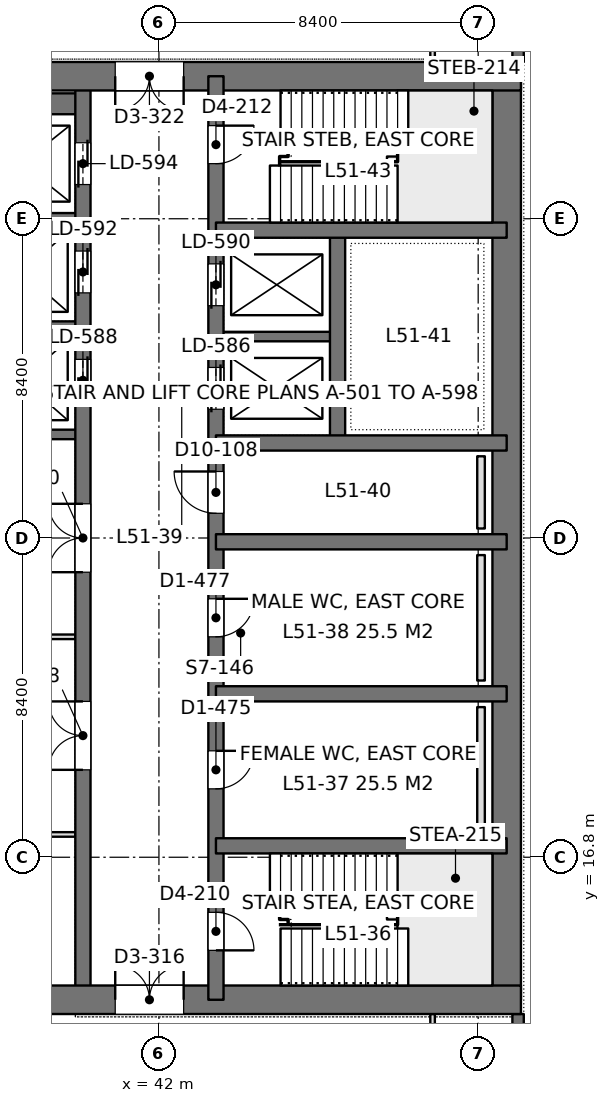
"""IFC4 building model, lengths in metres.
Left out: names, types, materials, properties, quantities, classifications, styles, units other than length and angle.
Written with IfcOpenShell. Run it as: python <this file> out.ifc"""

import sys

from ifc_helpers import new_model, si_unit, direction, frame, frame_2d, origin, place, context, subcontext, project, spatial, rectangle, extrude, element, fill, save


model = new_model("IFC4")
c1 = context("Model", 3, precision=1e-05, world=origin(), true_north=direction((0.0, 1.0)))
c2 = subcontext(c1, "Body", "Model", "MODEL_VIEW")
j1 = project(units=[si_unit("LENGTHUNIT", "METRE"), si_unit("PLANEANGLEUNIT", "RADIAN")], contexts=[c1])
p1 = place(None, origin())
s1 = spatial("IfcSite", under=j1, at=p1, CompositionType="ELEMENT")
p2 = place(p1, origin())
s2 = spatial("IfcBuilding", under=s1, at=p2, CompositionType="ELEMENT")
p3 = place(p2, frame((0.0, 0.0, 223.8)))
s3 = spatial("IfcBuildingStorey", under=s2, at=p3, CompositionType="ELEMENT", Elevation=223.8)
p4 = place(p3, frame((33.675, 13.05, 0.0), z_axis=(0.0, 0.0, 1.0), x_axis=(1.0, 0.0, 0.0)))
e1 = element("IfcWall", 1, at=p4, inside=s3, PredefinedType="SHEAR", context=c2, shape_type="SweptSolid", body=[
    extrude(rectangle(XDim=17.85, YDim=0.75, at=frame_2d((8.925, 0.0))), origin(), (0.0, 0.0, 1.0), 4.2),
])
p5 = place(p4, frame((7.175, 0.0, 0.0)))
e2 = element("IfcOpeningElement", 2, at=p5, cuts=e1, PredefinedType="OPENING", context=c2, shape_type="SweptSolid", body=[
    extrude(rectangle(XDim=1.8, YDim=2.4, at=frame_2d((0.9, 1.2))), frame((0.0, 0.385, 0.0), z_axis=(0.0, -1.0, 0.0), x_axis=(1.0, 0.0, 0.0)), (0.0, 0.0, 1.0), 0.77),
])
p6 = place(p3, frame((33.675, 37.35, 0.0), z_axis=(0.0, 0.0, 1.0), x_axis=(1.0, 0.0, 0.0)))
e3 = element("IfcWall", 3, at=p6, inside=s3, PredefinedType="SHEAR", context=c2, shape_type="SweptSolid", body=[
    extrude(rectangle(XDim=17.85, YDim=0.75, at=frame_2d((8.925, 0.0))), origin(), (0.0, 0.0, 1.0), 4.2),
])
p7 = place(p6, frame((7.175, 0.0, 0.0)))
e4 = element("IfcOpeningElement", 4, at=p7, cuts=e3, PredefinedType="OPENING", context=c2, shape_type="SweptSolid", body=[
    extrude(rectangle(XDim=1.8, YDim=2.4, at=frame_2d((0.9, 1.2))), frame((0.0, 0.385, 0.0), z_axis=(0.0, -1.0, 0.0), x_axis=(1.0, 0.0, 0.0)), (0.0, 0.0, 1.0), 0.77),
])
p8 = place(p3, frame((51.15, 13.05, 0.0), z_axis=(0.0, 0.0, 1.0), x_axis=(0.0, 1.0, 0.0)))
e5 = element("IfcWall", 5, at=p8, inside=s3, PredefinedType="SHEAR", context=c2, shape_type="SweptSolid", body=[
    extrude(rectangle(XDim=24.3, YDim=0.75, at=frame_2d((12.15, 0.0))), origin(), (0.0, 0.0, 1.0), 4.2),
])
p9 = place(p3, frame((43.5, 13.05, 0.0), z_axis=(0.0, 0.0, 1.0), x_axis=(0.0, 1.0, 0.0)))
e6 = element("IfcWall", 6, at=p9, inside=s3, PredefinedType="SHEAR", context=c2, shape_type="SweptSolid", body=[
    extrude(rectangle(XDim=24.3, YDim=0.4, at=frame_2d((12.15, 0.0))), origin(), (0.0, 0.0, 1.0), 4.2),
])
p10 = place(p9, frame((1.3, 0.0, 0.0)))
e7 = element("IfcOpeningElement", 7, at=p10, cuts=e6, PredefinedType="OPENING", context=c2, shape_type="SweptSolid", body=[
    extrude(rectangle(XDim=1.0, YDim=2.2, at=frame_2d((0.5, 1.1))), frame((0.0, 0.21, 0.0), z_axis=(0.0, -1.0, 0.0), x_axis=(1.0, 0.0, 0.0)), (0.0, 0.0, 1.0), 0.42),
])
p11 = place(p9, frame((22.0, 0.0, 0.0)))
e8 = element("IfcOpeningElement", 8, at=p11, cuts=e6, PredefinedType="OPENING", context=c2, shape_type="SweptSolid", body=[
    extrude(rectangle(XDim=1.0, YDim=2.2, at=frame_2d((0.5, 1.1))), frame((0.0, 0.21, 0.0), z_axis=(0.0, -1.0, 0.0), x_axis=(1.0, 0.0, 0.0)), (0.0, 0.0, 1.0), 0.42),
])
p12 = place(p9, frame((5.55, 0.0, 0.0)))
e9 = element("IfcOpeningElement", 9, at=p12, cuts=e6, PredefinedType="OPENING", context=c2, shape_type="SweptSolid", body=[
    extrude(rectangle(XDim=1.0, YDim=2.2, at=frame_2d((0.5, 1.1))), frame((0.0, 0.21, 0.0), z_axis=(0.0, -1.0, 0.0), x_axis=(1.0, 0.0, 0.0)), (0.0, 0.0, 1.0), 0.42),
])
p13 = place(p9, frame((9.55, 0.0, 0.0)))
e10 = element("IfcOpeningElement", 10, at=p13, cuts=e6, PredefinedType="OPENING", context=c2, shape_type="SweptSolid", body=[
    extrude(rectangle(XDim=1.0, YDim=2.2, at=frame_2d((0.5, 1.1))), frame((0.0, 0.21, 0.0), z_axis=(0.0, -1.0, 0.0), x_axis=(1.0, 0.0, 0.0)), (0.0, 0.0, 1.0), 0.42),
])
p14 = place(p9, frame((12.8, 0.0, 0.0)))
e11 = element("IfcOpeningElement", 11, at=p14, cuts=e6, PredefinedType="OPENING", context=c2, shape_type="SweptSolid", body=[
    extrude(rectangle(XDim=1.1, YDim=2.2, at=frame_2d((0.55, 1.1))), frame((0.0, 0.21, 0.0), z_axis=(0.0, -1.0, 0.0), x_axis=(1.0, 0.0, 0.0)), (0.0, 0.0, 1.0), 0.42),
])
p15 = place(p9, frame((15.538, 0.0, 0.0)))
e12 = element("IfcOpeningElement", 12, at=p15, cuts=e6, PredefinedType="OPENING", context=c2, shape_type="SweptSolid", body=[
    extrude(rectangle(XDim=1.1, YDim=2.2, at=frame_2d((0.55, 1.1))), frame((0.0, 0.21, 0.0), z_axis=(0.0, -1.0, 0.0), x_axis=(1.0, 0.0, 0.0)), (0.0, 0.0, 1.0), 0.42),
])
p16 = place(p9, frame((18.262, 0.0, 0.0)))
e13 = element("IfcOpeningElement", 13, at=p16, cuts=e6, PredefinedType="OPENING", context=c2, shape_type="SweptSolid", body=[
    extrude(rectangle(XDim=1.1, YDim=2.2, at=frame_2d((0.55, 1.1))), frame((0.0, 0.21, 0.0), z_axis=(0.0, -1.0, 0.0), x_axis=(1.0, 0.0, 0.0)), (0.0, 0.0, 1.0), 0.42),
])
p17 = place(p3, frame((40.0, 13.05, 0.0), z_axis=(0.0, 0.0, 1.0), x_axis=(0.0, 1.0, 0.0)))
e14 = element("IfcWall", 14, at=p17, inside=s3, PredefinedType="SHEAR", context=c2, shape_type="SweptSolid", body=[
    extrude(rectangle(XDim=24.3, YDim=0.4, at=frame_2d((12.15, 0.0))), origin(), (0.0, 0.0, 1.0), 4.2),
])
p18 = place(p17, frame((15.75, 0.0, 0.0)))
e15 = element("IfcOpeningElement", 15, at=p18, cuts=e14, PredefinedType="OPENING", context=c2, shape_type="SweptSolid", body=[
    extrude(rectangle(XDim=1.1, YDim=2.2, at=frame_2d((0.55, 1.1))), frame((0.0, 0.21, 0.0), z_axis=(0.0, -1.0, 0.0), x_axis=(1.0, 0.0, 0.0)), (0.0, 0.0, 1.0), 0.42),
])
p19 = place(p17, frame((18.6, 0.0, 0.0)))
e16 = element("IfcOpeningElement", 16, at=p19, cuts=e14, PredefinedType="OPENING", context=c2, shape_type="SweptSolid", body=[
    extrude(rectangle(XDim=1.1, YDim=2.2, at=frame_2d((0.55, 1.1))), frame((0.0, 0.21, 0.0), z_axis=(0.0, -1.0, 0.0), x_axis=(1.0, 0.0, 0.0)), (0.0, 0.0, 1.0), 0.42),
])
p20 = place(p17, frame((21.45, 0.0, 0.0)))
e17 = element("IfcOpeningElement", 17, at=p20, cuts=e14, PredefinedType="OPENING", context=c2, shape_type="SweptSolid", body=[
    extrude(rectangle(XDim=1.1, YDim=2.2, at=frame_2d((0.55, 1.1))), frame((0.0, 0.21, 0.0), z_axis=(0.0, -1.0, 0.0), x_axis=(1.0, 0.0, 0.0)), (0.0, 0.0, 1.0), 0.42),
])
p21 = place(p17, frame((6.05, 0.0, 0.0)))
e18 = element("IfcOpeningElement", 18, at=p21, cuts=e14, PredefinedType="OPENING", context=c2, shape_type="SweptSolid", body=[
    extrude(rectangle(XDim=1.8, YDim=2.4, at=frame_2d((0.9, 1.2))), frame((0.0, 0.21, 0.0), z_axis=(0.0, -1.0, 0.0), x_axis=(1.0, 0.0, 0.0)), (0.0, 0.0, 1.0), 0.42),
])
p22 = place(p17, frame((11.25, 0.0, 0.0)))
e19 = element("IfcOpeningElement", 19, at=p22, cuts=e14, PredefinedType="OPENING", context=c2, shape_type="SweptSolid", body=[
    extrude(rectangle(XDim=1.8, YDim=2.4, at=frame_2d((0.9, 1.2))), frame((0.0, 0.21, 0.0), z_axis=(0.0, -1.0, 0.0), x_axis=(1.0, 0.0, 0.0)), (0.0, 0.0, 1.0), 0.42),
])
for number, where, z_axis, x_axis in (
    (20, (51.15, 17.1, 0.0), (0.0, 0.0, 1.0), (-1.0, 0.0, 0.0)),
    (21, (51.15, 21.1, 0.0), (0.0, 0.0, 1.0), (-1.0, 0.0, 0.0)),
    (22, (51.15, 25.1, 0.0), (0.0, 0.0, 1.0), (-1.0, 0.0, 0.0)),
    (23, (51.15, 27.7, 0.0), (0.0, 0.0, 1.0), (-1.0, 0.0, 0.0)),
    (24, (51.15, 33.3, 0.0), (0.0, 0.0, 1.0), (-1.0, 0.0, 0.0)),
):
    element("IfcWall", number, at=place(p3, frame(where, z_axis=z_axis, x_axis=x_axis)), inside=s3, PredefinedType="SHEAR", context=c2, shape_type="SweptSolid", body=[
        extrude(rectangle(XDim=7.65, YDim=0.4, at=frame_2d((3.825, 0.0))), origin(), (0.0, 0.0, 1.0), 4.2),
    ])
p23 = place(p3, frame((46.7, 27.7, 0.0), z_axis=(0.0, 0.0, 1.0), x_axis=(0.0, 1.0, 0.0)))
e25 = element("IfcWall", 25, at=p23, inside=s3, PredefinedType="SHEAR", context=c2, shape_type="SweptSolid", body=[
    extrude(rectangle(XDim=5.6, YDim=0.4, at=frame_2d((2.8, 0.0))), origin(), (0.0, 0.0, 1.0), 4.2),
])
p24 = place(p3, frame((46.7, 30.5, 0.0), z_axis=(0.0, 0.0, 1.0), x_axis=(-1.0, 0.0, 0.0)))
e26 = element("IfcWall", 26, at=p24, inside=s3, PredefinedType="SHEAR", context=c2, shape_type="SweptSolid", body=[
    extrude(rectangle(XDim=3.2, YDim=0.25, at=frame_2d((1.6, 0.0))), origin(), (0.0, 0.0, 1.0), 4.2),
])
p25 = place(p3, frame((40.0, 27.925, 0.0), z_axis=(0.0, 0.0, 1.0), x_axis=(-1.0, 0.0, 0.0)))
e27 = element("IfcWall", 27, at=p25, inside=s3, PredefinedType="SHEAR", context=c2, shape_type="SweptSolid", body=[
    extrude(rectangle(XDim=5.95, YDim=0.25, at=frame_2d((2.975, 0.0))), origin(), (0.0, 0.0, 1.0), 4.2),
])
for number, where, z_axis, x_axis in (
    (28, (40.0, 30.775, 0.0), (0.0, 0.0, 1.0), (-1.0, 0.0, 0.0)),
    (29, (40.0, 33.625, 0.0), (0.0, 0.0, 1.0), (-1.0, 0.0, 0.0)),
):
    element("IfcWall", number, at=place(p3, frame(where, z_axis=z_axis, x_axis=x_axis)), inside=s3, PredefinedType="SHEAR", context=c2, shape_type="SweptSolid", body=[
        extrude(rectangle(XDim=3.2, YDim=0.25, at=frame_2d((1.6, 0.0))), origin(), (0.0, 0.0, 1.0), 4.2),
    ])
p26 = place(p3, frame((40.0, 36.625, 0.0), z_axis=(0.0, 0.0, 1.0), x_axis=(-1.0, 0.0, 0.0)))
e30 = element("IfcWall", 30, at=p26, inside=s3, PredefinedType="SHEAR", context=c2, shape_type="SweptSolid", body=[
    extrude(rectangle(XDim=3.2, YDim=0.55, at=frame_2d((1.6, 0.0))), origin(), (0.0, 0.0, 1.0), 4.2),
])
p27 = place(p3, frame((51.45, 42.0, 0.0), z_axis=(0.0, 0.0, 1.0), x_axis=(0.0, -1.0, 0.0)))
e31 = element("IfcWall", 31, at=p27, inside=s3, PredefinedType="SOLIDWALL", context=c2, shape_type="SweptSolid", body=[
    extrude(rectangle(XDim=4.275, YDim=0.3, at=frame_2d((2.137, 0.0))), origin(), (0.0, 0.0, 1.0), 4.05),
])
p28 = place(p27, frame((0.938, 0.0, 0.9)))
e32 = element("IfcOpeningElement", 32, at=p28, cuts=e31, PredefinedType="OPENING", context=c2, shape_type="SweptSolid", body=[
    extrude(rectangle(XDim=2.4, YDim=1.9, at=frame_2d((1.2, 0.95))), frame((0.0, 0.16, 0.0), z_axis=(0.0, -1.0, 0.0), x_axis=(1.0, 0.0, 0.0)), (0.0, 0.0, 1.0), 0.32),
])
p29 = place(p3, frame((51.45, 12.675, 0.0), z_axis=(0.0, 0.0, 1.0), x_axis=(0.0, -1.0, 0.0)))
e33 = element("IfcWall", 33, at=p29, inside=s3, PredefinedType="SOLIDWALL", context=c2, shape_type="SweptSolid", body=[
    extrude(rectangle(XDim=4.275, YDim=0.3, at=frame_2d((2.138, 0.0))), origin(), (0.0, 0.0, 1.0), 4.05),
])
p30 = place(p29, frame((0.938, 0.0, 0.9)))
e34 = element("IfcOpeningElement", 34, at=p30, cuts=e33, PredefinedType="OPENING", context=c2, shape_type="SweptSolid", body=[
    extrude(rectangle(XDim=2.4, YDim=1.9, at=frame_2d((1.2, 0.95))), frame((0.0, 0.16, 0.0), z_axis=(0.0, -1.0, 0.0), x_axis=(1.0, 0.0, 0.0)), (0.0, 0.0, 1.0), 0.32),
])
p31 = place(p3, frame((33.898, 17.4, 0.0), z_axis=(0.0, 0.0, 1.0), x_axis=(1.0, 0.0, 0.0)))
e35 = element("IfcWall", 35, at=p31, inside=s3, PredefinedType="PARTITIONING", context=c2, shape_type="SweptSolid", body=[
    extrude(rectangle(XDim=5.904, YDim=0.12, at=frame_2d((2.952, 0.0))), origin(), (0.0, 0.0, 1.0), 3.55),
])
p32 = place(p3, frame((34.749, 22.6, 0.0), z_axis=(0.0, 0.0, 1.0), x_axis=(1.0, 0.0, 0.0)))
e36 = element("IfcWall", 36, at=p32, inside=s3, PredefinedType="PARTITIONING", context=c2, shape_type="SweptSolid", body=[
    extrude(rectangle(XDim=5.053, YDim=0.12, at=frame_2d((2.526, 0.0))), origin(), (0.0, 0.0, 1.0), 4.05),
])
for number, where, z_axis, x_axis in (
    (37, (49.2, 11.1, 0.0), (0.0, 0.0, 1.0), (0.0, 1.0, 0.0)),
    (38, (49.2, 37.724, 0.0), (0.0, 0.0, 1.0), (0.0, 1.0, 0.0)),
):
    element("IfcWall", number, at=place(p3, frame(where, z_axis=z_axis, x_axis=x_axis)), inside=s3, PredefinedType="PARTITIONING", context=c2, shape_type="SweptSolid", body=[
        extrude(rectangle(XDim=1.576, YDim=0.12, at=frame_2d((0.788, 0.0))), origin(), (0.0, 0.0, 1.0), 4.05),
    ])
for number, where, z_axis, x_axis in (
    (39, (50.475, 17.45, 0.0), (0.0, 0.0, 1.0), (0.0, 1.0, 0.0)),
    (40, (50.475, 21.45, 0.0), (0.0, 0.0, 1.0), (0.0, 1.0, 0.0)),
):
    element("IfcWall", number, at=place(p3, frame(where, z_axis=z_axis, x_axis=x_axis)), inside=s3, PredefinedType="PLUMBINGWALL", context=c2, shape_type="SweptSolid", body=[
        extrude(rectangle(XDim=3.3, YDim=0.2, at=frame_2d((1.65, 0.0))), origin(), (0.0, 0.0, 1.0), 1.2),
    ])
p33 = place(p3, frame((50.475, 25.45, 0.0), z_axis=(0.0, 0.0, 1.0), x_axis=(0.0, 1.0, 0.0)))
e41 = element("IfcWall", 41, at=p33, inside=s3, PredefinedType="PLUMBINGWALL", context=c2, shape_type="SweptSolid", body=[
    extrude(rectangle(XDim=1.9, YDim=0.2, at=frame_2d((0.95, 0.0))), origin(), (0.0, 0.0, 1.0), 1.2),
])
p34 = place(p5, origin())
e42 = element("IfcDoor", 42, at=p34, inside=s3, OperationType="DOUBLE_DOOR_SINGLE_SWING", PredefinedType="DOOR", context=c2, shape_type="SweptSolid", body=[
    extrude(rectangle(XDim=1.8, YDim=2.4, at=frame_2d((0.9, 1.2))), frame((0.0, 0.025, 0.0), z_axis=(0.0, -1.0, 0.0), x_axis=(1.0, 0.0, 0.0)), (0.0, 0.0, 1.0), 0.05),
])
fill(e2, e42)
p35 = place(p7, frame((1.8, 0.0, 0.0), z_axis=(0.0, 0.0, 1.0), x_axis=(-1.0, 0.0, 0.0)))
e43 = element("IfcDoor", 43, at=p35, inside=s3, OperationType="DOUBLE_DOOR_SINGLE_SWING", PredefinedType="DOOR", context=c2, shape_type="SweptSolid", body=[
    extrude(rectangle(XDim=1.8, YDim=2.4, at=frame_2d((0.9, 1.2))), frame((0.0, 0.025, 0.0), z_axis=(0.0, -1.0, 0.0), x_axis=(1.0, 0.0, 0.0)), (0.0, 0.0, 1.0), 0.05),
])
fill(e4, e43)
p36 = place(p10, frame((1.0, 0.0, 0.0), z_axis=(0.0, 0.0, 1.0), x_axis=(-1.0, 0.0, 0.0)))
e44 = element("IfcDoor", 44, at=p36, inside=s3, OperationType="SINGLE_SWING_RIGHT", PredefinedType="DOOR", context=c2, shape_type="SweptSolid", body=[
    extrude(rectangle(XDim=1.0, YDim=2.2, at=frame_2d((0.5, 1.1))), frame((0.0, 0.025, 0.0), z_axis=(0.0, -1.0, 0.0), x_axis=(1.0, 0.0, 0.0)), (0.0, 0.0, 1.0), 0.05),
])
fill(e7, e44)
p37 = place(p11, frame((1.0, 0.0, 0.0), z_axis=(0.0, 0.0, 1.0), x_axis=(-1.0, 0.0, 0.0)))
e45 = element("IfcDoor", 45, at=p37, inside=s3, OperationType="SINGLE_SWING_LEFT", PredefinedType="DOOR", context=c2, shape_type="SweptSolid", body=[
    extrude(rectangle(XDim=1.0, YDim=2.2, at=frame_2d((0.5, 1.1))), frame((0.0, 0.025, 0.0), z_axis=(0.0, -1.0, 0.0), x_axis=(1.0, 0.0, 0.0)), (0.0, 0.0, 1.0), 0.05),
])
fill(e8, e45)
p38 = place(p12, frame((1.0, 0.0, 0.0), z_axis=(0.0, 0.0, 1.0), x_axis=(-1.0, 0.0, 0.0)))
e46 = element("IfcDoor", 46, at=p38, inside=s3, OperationType="SINGLE_SWING_LEFT", PredefinedType="DOOR", context=c2, shape_type="SweptSolid", body=[
    extrude(rectangle(XDim=1.0, YDim=2.2, at=frame_2d((0.5, 1.1))), frame((0.0, 0.025, 0.0), z_axis=(0.0, -1.0, 0.0), x_axis=(1.0, 0.0, 0.0)), (0.0, 0.0, 1.0), 0.05),
])
fill(e9, e46)
p39 = place(p13, frame((1.0, 0.0, 0.0), z_axis=(0.0, 0.0, 1.0), x_axis=(-1.0, 0.0, 0.0)))
e47 = element("IfcDoor", 47, at=p39, inside=s3, OperationType="SINGLE_SWING_LEFT", PredefinedType="DOOR", context=c2, shape_type="SweptSolid", body=[
    extrude(rectangle(XDim=1.0, YDim=2.2, at=frame_2d((0.5, 1.1))), frame((0.0, 0.025, 0.0), z_axis=(0.0, -1.0, 0.0), x_axis=(1.0, 0.0, 0.0)), (0.0, 0.0, 1.0), 0.05),
])
fill(e10, e47)
p40 = place(p14, origin())
e48 = element("IfcDoor", 48, at=p40, inside=s3, OperationType="SINGLE_SWING_RIGHT", PredefinedType="DOOR", context=c2, shape_type="SweptSolid", body=[
    extrude(rectangle(XDim=1.1, YDim=2.2, at=frame_2d((0.55, 1.1))), frame((0.0, 0.025, 0.0), z_axis=(0.0, -1.0, 0.0), x_axis=(1.0, 0.0, 0.0)), (0.0, 0.0, 1.0), 0.05),
])
fill(e11, e48)
p41 = place(p18, origin())
e49 = element("IfcDoor", 49, at=p41, inside=s3, OperationType="DOUBLE_DOOR_SLIDING", PredefinedType="DOOR", context=c2, shape_type="SweptSolid", body=[
    extrude(rectangle(XDim=1.1, YDim=2.2, at=frame_2d((0.55, 1.1))), frame((0.0, 0.025, 0.0), z_axis=(0.0, -1.0, 0.0), x_axis=(1.0, 0.0, 0.0)), (0.0, 0.0, 1.0), 0.05),
])
fill(e15, e49)
p42 = place(p19, origin())
e50 = element("IfcDoor", 50, at=p42, inside=s3, OperationType="DOUBLE_DOOR_SLIDING", PredefinedType="DOOR", context=c2, shape_type="SweptSolid", body=[
    extrude(rectangle(XDim=1.1, YDim=2.2, at=frame_2d((0.55, 1.1))), frame((0.0, 0.025, 0.0), z_axis=(0.0, -1.0, 0.0), x_axis=(1.0, 0.0, 0.0)), (0.0, 0.0, 1.0), 0.05),
])
fill(e16, e50)
p43 = place(p20, origin())
e51 = element("IfcDoor", 51, at=p43, inside=s3, OperationType="DOUBLE_DOOR_SLIDING", PredefinedType="DOOR", context=c2, shape_type="SweptSolid", body=[
    extrude(rectangle(XDim=1.1, YDim=2.2, at=frame_2d((0.55, 1.1))), frame((0.0, 0.025, 0.0), z_axis=(0.0, -1.0, 0.0), x_axis=(1.0, 0.0, 0.0)), (0.0, 0.0, 1.0), 0.05),
])
fill(e17, e51)
p44 = place(p15, origin())
e52 = element("IfcDoor", 52, at=p44, inside=s3, OperationType="DOUBLE_DOOR_SLIDING", PredefinedType="DOOR", context=c2, shape_type="SweptSolid", body=[
    extrude(rectangle(XDim=1.1, YDim=2.2, at=frame_2d((0.55, 1.1))), frame((0.0, 0.025, 0.0), z_axis=(0.0, -1.0, 0.0), x_axis=(1.0, 0.0, 0.0)), (0.0, 0.0, 1.0), 0.05),
])
fill(e12, e52)
p45 = place(p16, origin())
e53 = element("IfcDoor", 53, at=p45, inside=s3, OperationType="DOUBLE_DOOR_SLIDING", PredefinedType="DOOR", context=c2, shape_type="SweptSolid", body=[
    extrude(rectangle(XDim=1.1, YDim=2.2, at=frame_2d((0.55, 1.1))), frame((0.0, 0.025, 0.0), z_axis=(0.0, -1.0, 0.0), x_axis=(1.0, 0.0, 0.0)), (0.0, 0.0, 1.0), 0.05),
])
fill(e13, e53)
p46 = place(p21, origin())
e54 = element("IfcDoor", 54, at=p46, inside=s3, OperationType="DOUBLE_DOOR_SINGLE_SWING", PredefinedType="DOOR", context=c2, shape_type="SweptSolid", body=[
    extrude(rectangle(XDim=1.8, YDim=2.4, at=frame_2d((0.9, 1.2))), frame((0.0, 0.025, 0.0), z_axis=(0.0, -1.0, 0.0), x_axis=(1.0, 0.0, 0.0)), (0.0, 0.0, 1.0), 0.05),
])
fill(e18, e54)
p47 = place(p22, origin())
e55 = element("IfcDoor", 55, at=p47, inside=s3, OperationType="DOUBLE_DOOR_SINGLE_SWING", PredefinedType="DOOR", context=c2, shape_type="SweptSolid", body=[
    extrude(rectangle(XDim=1.8, YDim=2.4, at=frame_2d((0.9, 1.2))), frame((0.0, 0.025, 0.0), z_axis=(0.0, -1.0, 0.0), x_axis=(1.0, 0.0, 0.0)), (0.0, 0.0, 1.0), 0.05),
])
fill(e19, e55)
save(model, sys.argv[1])
